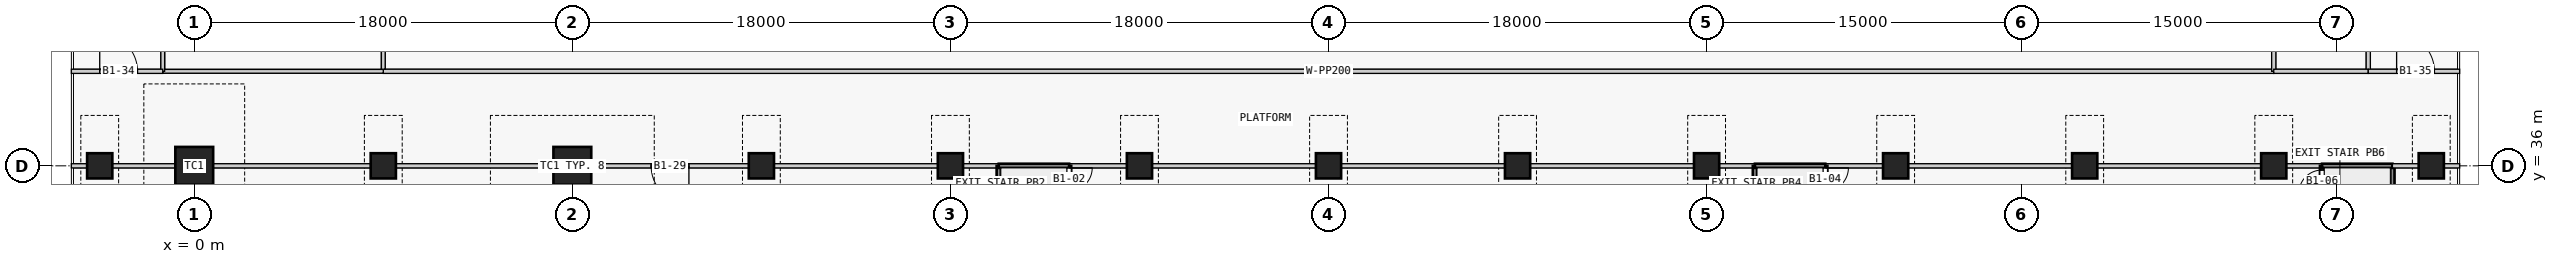
"""IFC4 building model, lengths in metres.
Left out: names, types, materials, properties, quantities, classifications, styles, units other than length and angle.
Written with IfcOpenShell. Run it as: python <this file> out.ifc"""

import sys

from ifc_helpers import new_model, si_unit, direction, frame, frame_2d, origin, origin_2d, place, context, subcontext, project, spatial, rectangle, extrude, element, fill, save


model = new_model("IFC4")
c1 = context("Model", 3, precision=1e-05, world=origin(), true_north=direction((0.0, 1.0)))
c2 = subcontext(c1, "Body", "Model", "MODEL_VIEW")
j1 = project(units=[si_unit("LENGTHUNIT", "METRE"), si_unit("PLANEANGLEUNIT", "RADIAN")], contexts=[c1])
p1 = place(None, origin())
s1 = spatial("IfcSite", under=j1, at=p1, CompositionType="ELEMENT")
p2 = place(p1, origin())
s2 = spatial("IfcBuilding", under=s1, at=p2, CompositionType="ELEMENT")
p3 = place(p2, frame((0.0, 0.0, -7.0)))
s3 = spatial("IfcBuildingStorey", under=s2, at=p3, CompositionType="ELEMENT", Elevation=-7.0)
p4 = place(p3, frame((-4.5, 36.0, 0.0), z_axis=(0.0, 0.0, 1.0), x_axis=(1.0, 0.0, 0.0)))
e1 = element("IfcColumn", 1, at=p4, inside=s3, PredefinedType="COLUMN", context=c2, shape_type="SweptSolid", body=[
    extrude(rectangle(XDim=1.2, YDim=1.2, at=origin_2d()), origin(), (0.0, 0.0, 1.0), 7.0),
])
p5 = place(p3, frame((0.0, 36.0, 0.0), z_axis=(0.0, 0.0, 1.0), x_axis=(1.0, 0.0, 0.0)))
e2 = element("IfcColumn", 2, at=p5, inside=s3, PredefinedType="COLUMN", context=c2, shape_type="SweptSolid", body=[
    extrude(rectangle(XDim=1.8, YDim=1.8, at=origin_2d()), origin(), (0.0, 0.0, 1.0), 7.0),
])
p6 = place(p3, frame((9.0, 36.0, 0.0), z_axis=(0.0, 0.0, 1.0), x_axis=(1.0, 0.0, 0.0)))
e3 = element("IfcColumn", 3, at=p6, inside=s3, PredefinedType="COLUMN", context=c2, shape_type="SweptSolid", body=[
    extrude(rectangle(XDim=1.2, YDim=1.2, at=origin_2d()), origin(), (0.0, 0.0, 1.0), 7.0),
])
p7 = place(p3, frame((18.0, 36.0, 0.0), z_axis=(0.0, 0.0, 1.0), x_axis=(1.0, 0.0, 0.0)))
e4 = element("IfcColumn", 4, at=p7, inside=s3, PredefinedType="COLUMN", context=c2, shape_type="SweptSolid", body=[
    extrude(rectangle(XDim=1.8, YDim=1.8, at=origin_2d()), origin(), (0.0, 0.0, 1.0), 7.0),
])
for number, where, z_axis, x_axis in (
    (5, (27.0, 36.0, 0.0), (0.0, 0.0, 1.0), (1.0, 0.0, 0.0)),
    (6, (36.0, 36.0, 0.0), (0.0, 0.0, 1.0), (1.0, 0.0, 0.0)),
    (7, (45.0, 36.0, 0.0), (0.0, 0.0, 1.0), (1.0, 0.0, 0.0)),
    (8, (54.0, 36.0, 0.0), (0.0, 0.0, 1.0), (1.0, 0.0, 0.0)),
    (9, (63.0, 36.0, 0.0), (0.0, 0.0, 1.0), (1.0, 0.0, 0.0)),
    (10, (72.0, 36.0, 0.0), (0.0, 0.0, 1.0), (1.0, 0.0, 0.0)),
    (11, (81.0, 36.0, 0.0), (0.0, 0.0, 1.0), (1.0, 0.0, 0.0)),
    (12, (90.0, 36.0, 0.0), (0.0, 0.0, 1.0), (1.0, 0.0, 0.0)),
    (13, (99.0, 36.0, 0.0), (0.0, 0.0, 1.0), (1.0, 0.0, 0.0)),
    (14, (106.5, 36.0, 0.0), (0.0, 0.0, 1.0), (1.0, 0.0, 0.0)),
):
    element("IfcColumn", number, at=place(p3, frame(where, z_axis=z_axis, x_axis=x_axis)), inside=s3, PredefinedType="COLUMN", context=c2, shape_type="SweptSolid", body=[
        extrude(rectangle(XDim=1.2, YDim=1.2, at=origin_2d()), origin(), (0.0, 0.0, 1.0), 7.0),
    ])
p8 = place(p3, frame((9.0, 40.5, 0.0), z_axis=(0.0, 0.0, 1.0), x_axis=(1.0, 0.0, 0.0)))
e15 = element("IfcWall", 15, at=p8, inside=s3, PredefinedType="PARTITIONING", context=c2, shape_type="SweptSolid", body=[
    extrude(rectangle(XDim=90.0, YDim=0.2, at=frame_2d((45.0, 0.0))), origin(), (0.0, 0.0, 1.0), 6.55),
])
p9 = place(p3, frame((38.3, 36.0, 0.0), z_axis=(0.0, 0.0, 1.0), x_axis=(-1.0, 0.0, 0.0)))
e16 = element("IfcWall", 16, at=p9, inside=s3, PredefinedType="PARTITIONING", context=c2, shape_type="SweptSolid", body=[
    extrude(rectangle(XDim=1.7, YDim=0.2, at=frame_2d((0.85, 0.0))), origin(), (0.0, 0.0, 1.0), 6.55),
])
p10 = place(p3, frame((35.4, 36.0, 0.0), z_axis=(0.0, 0.0, 1.0), x_axis=(-1.0, 0.0, 0.0)))
e17 = element("IfcWall", 17, at=p10, inside=s3, PredefinedType="PARTITIONING", context=c2, shape_type="SweptSolid", body=[
    extrude(rectangle(XDim=7.8, YDim=0.2, at=frame_2d((3.9, 0.0))), origin(), (0.0, 0.0, 1.0), 6.55),
])
p11 = place(p3, frame((26.4, 36.0, 0.0), z_axis=(0.0, 0.0, 1.0), x_axis=(-1.0, 0.0, 0.0)))
e18 = element("IfcWall", 18, at=p11, inside=s3, PredefinedType="PARTITIONING", context=c2, shape_type="SweptSolid", body=[
    extrude(rectangle(XDim=7.5, YDim=0.2, at=frame_2d((3.75, 0.0))), origin(), (0.0, 0.0, 1.0), 6.55),
])
p12 = place(p11, frame((2.85, 0.0, 0.0)))
e19 = element("IfcOpeningElement", 19, at=p12, cuts=e18, PredefinedType="OPENING", context=c2, shape_type="SweptSolid", body=[
    extrude(rectangle(XDim=1.8, YDim=2.1, at=frame_2d((0.9, 1.05))), frame((0.0, 0.11, 0.0), z_axis=(0.0, -1.0, 0.0), x_axis=(1.0, 0.0, 0.0)), (0.0, 0.0, 1.0), 0.22),
])
for number, where, z_axis, x_axis in (
    (20, (17.1, 36.0, 0.0), (0.0, 0.0, 1.0), (-1.0, 0.0, 0.0)),
    (21, (8.4, 36.0, 0.0), (0.0, 0.0, 1.0), (-1.0, 0.0, 0.0)),
):
    element("IfcWall", number, at=place(p3, frame(where, z_axis=z_axis, x_axis=x_axis)), inside=s3, PredefinedType="PARTITIONING", context=c2, shape_type="SweptSolid", body=[
        extrude(rectangle(XDim=7.5, YDim=0.2, at=frame_2d((3.75, 0.0))), origin(), (0.0, 0.0, 1.0), 6.55),
    ])
p13 = place(p3, frame((-0.9, 36.0, 0.0), z_axis=(0.0, 0.0, 1.0), x_axis=(-1.0, 0.0, 0.0)))
e22 = element("IfcWall", 22, at=p13, inside=s3, PredefinedType="PARTITIONING", context=c2, shape_type="SweptSolid", body=[
    extrude(rectangle(XDim=3.0, YDim=0.2, at=frame_2d((1.5, 0.0))), origin(), (0.0, 0.0, 1.0), 6.55),
])
p14 = place(p3, frame((-5.1, 36.0, 0.0), z_axis=(0.0, 0.0, 1.0), x_axis=(-1.0, 0.0, 0.0)))
e23 = element("IfcWall", 23, at=p14, inside=s3, PredefinedType="PARTITIONING", context=c2, shape_type="SweptSolid", body=[
    extrude(rectangle(XDim=0.75, YDim=0.2, at=frame_2d((0.375, 0.0))), origin(), (0.0, 0.0, 1.0), 6.55),
])
p15 = place(p3, frame((74.3, 36.0, 0.0), z_axis=(0.0, 0.0, 1.0), x_axis=(-1.0, 0.0, 0.0)))
e24 = element("IfcWall", 24, at=p15, inside=s3, PredefinedType="PARTITIONING", context=c2, shape_type="SweptSolid", body=[
    extrude(rectangle(XDim=1.7, YDim=0.2, at=frame_2d((0.85, 0.0))), origin(), (0.0, 0.0, 1.0), 6.55),
])
for number, where, z_axis, x_axis in (
    (25, (71.4, 36.0, 0.0), (0.0, 0.0, 1.0), (-1.0, 0.0, 0.0)),
    (26, (62.4, 36.0, 0.0), (0.0, 0.0, 1.0), (-1.0, 0.0, 0.0)),
    (27, (53.4, 36.0, 0.0), (0.0, 0.0, 1.0), (-1.0, 0.0, 0.0)),
):
    element("IfcWall", number, at=place(p3, frame(where, z_axis=z_axis, x_axis=x_axis)), inside=s3, PredefinedType="PARTITIONING", context=c2, shape_type="SweptSolid", body=[
        extrude(rectangle(XDim=7.8, YDim=0.2, at=frame_2d((3.9, 0.0))), origin(), (0.0, 0.0, 1.0), 6.55),
    ])
p16 = place(p3, frame((44.4, 36.0, 0.0), z_axis=(0.0, 0.0, 1.0), x_axis=(-1.0, 0.0, 0.0)))
e28 = element("IfcWall", 28, at=p16, inside=s3, PredefinedType="PARTITIONING", context=c2, shape_type="SweptSolid", body=[
    extrude(rectangle(XDim=2.75, YDim=0.2, at=frame_2d((1.375, 0.0))), origin(), (0.0, 0.0, 1.0), 6.55),
])
p17 = place(p3, frame((101.3, 36.0, 0.0), z_axis=(0.0, 0.0, 1.0), x_axis=(-1.0, 0.0, 0.0)))
e29 = element("IfcWall", 29, at=p17, inside=s3, PredefinedType="PARTITIONING", context=c2, shape_type="SweptSolid", body=[
    extrude(rectangle(XDim=1.7, YDim=0.2, at=frame_2d((0.85, 0.0))), origin(), (0.0, 0.0, 1.0), 6.55),
])
for number, where, z_axis, x_axis in (
    (30, (98.4, 36.0, 0.0), (0.0, 0.0, 1.0), (-1.0, 0.0, 0.0)),
    (31, (89.4, 36.0, 0.0), (0.0, 0.0, 1.0), (-1.0, 0.0, 0.0)),
):
    element("IfcWall", number, at=place(p3, frame(where, z_axis=z_axis, x_axis=x_axis)), inside=s3, PredefinedType="PARTITIONING", context=c2, shape_type="SweptSolid", body=[
        extrude(rectangle(XDim=7.8, YDim=0.2, at=frame_2d((3.9, 0.0))), origin(), (0.0, 0.0, 1.0), 6.55),
    ])
p18 = place(p3, frame((80.4, 36.0, 0.0), z_axis=(0.0, 0.0, 1.0), x_axis=(-1.0, 0.0, 0.0)))
e32 = element("IfcWall", 32, at=p18, inside=s3, PredefinedType="PARTITIONING", context=c2, shape_type="SweptSolid", body=[
    extrude(rectangle(XDim=2.75, YDim=0.2, at=frame_2d((1.375, 0.0))), origin(), (0.0, 0.0, 1.0), 6.55),
])
p19 = place(p3, frame((-1.5, 40.5, 0.0), z_axis=(0.0, 0.0, 1.0), x_axis=(1.0, 0.0, 0.0)))
e33 = element("IfcWall", 33, at=p19, inside=s3, PredefinedType="PARTITIONING", context=c2, shape_type="SweptSolid", body=[
    extrude(rectangle(XDim=10.5, YDim=0.18, at=frame_2d((5.25, 0.0))), origin(), (0.0, 0.0, 1.0), 6.55),
])
p20 = place(p3, frame((99.0, 44.3, 0.0), z_axis=(0.0, 0.0, 1.0), x_axis=(0.0, -1.0, 0.0)))
e34 = element("IfcWall", 34, at=p20, inside=s3, PredefinedType="PARTITIONING", context=c2, shape_type="SweptSolid", body=[
    extrude(rectangle(XDim=3.8, YDim=0.2, at=frame_2d((1.9, 0.0))), origin(), (0.0, 0.0, 1.0), 6.55),
])
p21 = place(p3, frame((41.65, 36.0, 0.0), z_axis=(0.0, 0.0, 1.0), x_axis=(0.0, -1.0, 0.0)))
e35 = element("IfcWall", 35, at=p21, inside=s3, PredefinedType="PARTITIONING", context=c2, shape_type="SweptSolid", body=[
    extrude(rectangle(XDim=6.9, YDim=0.2, at=frame_2d((3.45, 0.0))), origin(), (0.0, 0.0, 1.0), 6.55),
])
p22 = place(p21, frame((0.1, 0.0, 0.0)))
e36 = element("IfcOpeningElement", 36, at=p22, cuts=e35, PredefinedType="OPENING", context=c2, shape_type="SweptSolid", body=[
    extrude(rectangle(XDim=1.1, YDim=2.1, at=frame_2d((0.55, 1.05))), frame((0.0, 0.11, 0.0), z_axis=(0.0, -1.0, 0.0), x_axis=(1.0, 0.0, 0.0)), (0.0, 0.0, 1.0), 0.22),
])
p23 = place(p3, frame((77.65, 36.0, 0.0), z_axis=(0.0, 0.0, 1.0), x_axis=(0.0, -1.0, 0.0)))
e37 = element("IfcWall", 37, at=p23, inside=s3, PredefinedType="PARTITIONING", context=c2, shape_type="SweptSolid", body=[
    extrude(rectangle(XDim=6.9, YDim=0.2, at=frame_2d((3.45, 0.0))), origin(), (0.0, 0.0, 1.0), 6.55),
])
p24 = place(p23, frame((0.1, 0.0, 0.0)))
e38 = element("IfcOpeningElement", 38, at=p24, cuts=e37, PredefinedType="OPENING", context=c2, shape_type="SweptSolid", body=[
    extrude(rectangle(XDim=1.1, YDim=2.1, at=frame_2d((0.55, 1.05))), frame((0.0, 0.11, 0.0), z_axis=(0.0, -1.0, 0.0), x_axis=(1.0, 0.0, 0.0)), (0.0, 0.0, 1.0), 0.22),
])
p25 = place(p3, frame((104.65, 36.0, 0.0), z_axis=(0.0, 0.0, 1.0), x_axis=(0.0, -1.0, 0.0)))
e39 = element("IfcWall", 39, at=p25, inside=s3, PredefinedType="PARTITIONING", context=c2, shape_type="SweptSolid", body=[
    extrude(rectangle(XDim=6.9, YDim=0.2, at=frame_2d((3.45, 0.0))), origin(), (0.0, 0.0, 1.0), 6.55),
])
p26 = place(p3, frame((-1.5, 49.5, 0.0), z_axis=(0.0, 0.0, 1.0), x_axis=(0.0, -1.0, 0.0)))
e40 = element("IfcWall", 40, at=p26, inside=s3, PredefinedType="PARTITIONING", context=c2, shape_type="SweptSolid", body=[
    extrude(rectangle(XDim=9.0, YDim=0.18, at=frame_2d((4.5, 0.0))), origin(), (0.0, 0.0, 1.0), 6.55),
])
p27 = place(p3, frame((9.0, 40.6, 0.0), z_axis=(0.0, 0.0, 1.0), x_axis=(0.0, 1.0, 0.0)))
e41 = element("IfcWall", 41, at=p27, inside=s3, PredefinedType="PARTITIONING", context=c2, shape_type="SweptSolid", body=[
    extrude(rectangle(XDim=8.8, YDim=0.18, at=frame_2d((4.4, 0.0))), origin(), (0.0, 0.0, 1.0), 6.55),
])
p28 = place(p3, frame((103.5, 40.5, 0.0), z_axis=(0.0, 0.0, 1.0), x_axis=(0.0, 1.0, 0.0)))
e42 = element("IfcWall", 42, at=p28, inside=s3, PredefinedType="PARTITIONING", context=c2, shape_type="SweptSolid", body=[
    extrude(rectangle(XDim=9.0, YDim=0.2, at=frame_2d((4.5, 0.0))), origin(), (0.0, 0.0, 1.0), 6.55),
])
p29 = place(p28, frame((4.1, 0.0, 0.0)))
e43 = element("IfcOpeningElement", 43, at=p29, cuts=e42, PredefinedType="OPENING", context=c2, shape_type="SweptSolid", body=[
    extrude(rectangle(XDim=0.9, YDim=2.1, at=frame_2d((0.45, 1.05))), frame((0.0, 0.11, 0.0), z_axis=(0.0, -1.0, 0.0), x_axis=(1.0, 0.0, 0.0)), (0.0, 0.0, 1.0), 0.22),
])
for number, where, z_axis, x_axis in (
    (44, (38.3, 29.1, 0.0), (0.0, 0.0, 1.0), (0.0, 1.0, 0.0)),
    (45, (74.3, 29.1, 0.0), (0.0, 0.0, 1.0), (0.0, 1.0, 0.0)),
):
    element("IfcWall", number, at=place(p3, frame(where, z_axis=z_axis, x_axis=x_axis)), inside=s3, PredefinedType="PARTITIONING", context=c2, shape_type="SweptSolid", body=[
        extrude(rectangle(XDim=6.9, YDim=0.2, at=frame_2d((3.45, 0.0))), origin(), (0.0, 0.0, 1.0), 6.55),
    ])
p30 = place(p3, frame((101.3, 29.1, 0.0), z_axis=(0.0, 0.0, 1.0), x_axis=(0.0, 1.0, 0.0)))
e46 = element("IfcWall", 46, at=p30, inside=s3, PredefinedType="PARTITIONING", context=c2, shape_type="SweptSolid", body=[
    extrude(rectangle(XDim=6.9, YDim=0.2, at=frame_2d((3.45, 0.0))), origin(), (0.0, 0.0, 1.0), 6.55),
])
p31 = place(p30, frame((5.6, 0.0, 0.0)))
e47 = element("IfcOpeningElement", 47, at=p31, cuts=e46, PredefinedType="OPENING", context=c2, shape_type="SweptSolid", body=[
    extrude(rectangle(XDim=1.1, YDim=2.1, at=frame_2d((0.55, 1.05))), frame((0.0, 0.11, 0.0), z_axis=(0.0, -1.0, 0.0), x_axis=(1.0, 0.0, 0.0)), (0.0, 0.0, 1.0), 0.22),
])
p32 = place(p3, frame((99.0, 40.5, 0.0), z_axis=(0.0, 0.0, 1.0), x_axis=(1.0, 0.0, 0.0)))
e48 = element("IfcWall", 48, at=p32, inside=s3, PredefinedType="PARTITIONING", context=c2, shape_type="SweptSolid", body=[
    extrude(rectangle(XDim=4.5, YDim=0.2, at=frame_2d((2.25, 0.0))), origin(), (0.0, 0.0, 1.0), 6.55),
])
p33 = place(p3, frame((-5.85, 40.5, 0.0), z_axis=(0.0, 0.0, 1.0), x_axis=(1.0, 0.0, 0.0)))
e49 = element("IfcWall", 49, at=p33, inside=s3, PredefinedType="PARTITIONING", context=c2, shape_type="SweptSolid", body=[
    extrude(rectangle(XDim=4.35, YDim=0.2, at=frame_2d((2.175, 0.0))), origin(), (0.0, 0.0, 1.0), 6.55),
])
p34 = place(p33, frame((1.35, 0.0, 0.0)))
e50 = element("IfcOpeningElement", 50, at=p34, cuts=e49, PredefinedType="OPENING", context=c2, shape_type="SweptSolid", body=[
    extrude(rectangle(XDim=1.8, YDim=2.1, at=frame_2d((0.9, 1.05))), frame((0.0, 0.11, 0.0), z_axis=(0.0, -1.0, 0.0), x_axis=(1.0, 0.0, 0.0)), (0.0, 0.0, 1.0), 0.22),
])
p35 = place(p3, frame((103.5, 40.5, 0.0), z_axis=(0.0, 0.0, 1.0), x_axis=(1.0, 0.0, 0.0)))
e51 = element("IfcWall", 51, at=p35, inside=s3, PredefinedType="PARTITIONING", context=c2, shape_type="SweptSolid", body=[
    extrude(rectangle(XDim=4.35, YDim=0.2, at=frame_2d((2.175, 0.0))), origin(), (0.0, 0.0, 1.0), 6.55),
])
p36 = place(p35, frame((1.35, 0.0, 0.0)))
e52 = element("IfcOpeningElement", 52, at=p36, cuts=e51, PredefinedType="OPENING", context=c2, shape_type="SweptSolid", body=[
    extrude(rectangle(XDim=1.8, YDim=2.1, at=frame_2d((0.9, 1.05))), frame((0.0, 0.11, 0.0), z_axis=(0.0, -1.0, 0.0), x_axis=(1.0, 0.0, 0.0)), (0.0, 0.0, 1.0), 0.22),
])
for number, where, z_axis, x_axis in (
    (53, (38.3, 36.0, 0.0), (0.0, 0.0, 1.0), (1.0, 0.0, 0.0)),
    (54, (74.3, 36.0, 0.0), (0.0, 0.0, 1.0), (1.0, 0.0, 0.0)),
    (55, (101.3, 36.0, 0.0), (0.0, 0.0, 1.0), (1.0, 0.0, 0.0)),
):
    element("IfcWall", number, at=place(p3, frame(where, z_axis=z_axis, x_axis=x_axis)), inside=s3, PredefinedType="PARTITIONING", context=c2, shape_type="SweptSolid", body=[
        extrude(rectangle(XDim=3.35, YDim=0.2, at=frame_2d((1.675, 0.0))), origin(), (0.0, 0.0, 1.0), 6.55),
    ])
p37 = place(p3, frame((107.85, 36.0, 0.0), z_axis=(0.0, 0.0, 1.0), x_axis=(-1.0, 0.0, 0.0)))
e56 = element("IfcWall", 56, at=p37, inside=s3, PredefinedType="PARTITIONING", context=c2, shape_type="SweptSolid", body=[
    extrude(rectangle(XDim=0.75, YDim=0.2, at=frame_2d((0.375, 0.0))), origin(), (0.0, 0.0, 1.0), 6.55),
])
p38 = place(p3, frame((105.9, 36.0, 0.0), z_axis=(0.0, 0.0, 1.0), x_axis=(-1.0, 0.0, 0.0)))
e57 = element("IfcWall", 57, at=p38, inside=s3, PredefinedType="PARTITIONING", context=c2, shape_type="SweptSolid", body=[
    extrude(rectangle(XDim=1.25, YDim=0.2, at=frame_2d((0.625, 0.0))), origin(), (0.0, 0.0, 1.0), 6.55),
])
p39 = place(p22, origin())
e58 = element("IfcDoor", 58, at=p39, inside=s3, OperationType="SINGLE_SWING_LEFT", PredefinedType="DOOR", context=c2, shape_type="SweptSolid", body=[
    extrude(rectangle(XDim=1.1, YDim=2.1, at=frame_2d((0.55, 1.05))), frame((0.0, 0.025, 0.0), z_axis=(0.0, -1.0, 0.0), x_axis=(1.0, 0.0, 0.0)), (0.0, 0.0, 1.0), 0.05),
])
fill(e36, e58)
p40 = place(p24, origin())
e59 = element("IfcDoor", 59, at=p40, inside=s3, OperationType="SINGLE_SWING_LEFT", PredefinedType="DOOR", context=c2, shape_type="SweptSolid", body=[
    extrude(rectangle(XDim=1.1, YDim=2.1, at=frame_2d((0.55, 1.05))), frame((0.0, 0.025, 0.0), z_axis=(0.0, -1.0, 0.0), x_axis=(1.0, 0.0, 0.0)), (0.0, 0.0, 1.0), 0.05),
])
fill(e38, e59)
p41 = place(p31, origin())
e60 = element("IfcDoor", 60, at=p41, inside=s3, OperationType="SINGLE_SWING_RIGHT", PredefinedType="DOOR", context=c2, shape_type="SweptSolid", body=[
    extrude(rectangle(XDim=1.1, YDim=2.1, at=frame_2d((0.55, 1.05))), frame((0.0, 0.025, 0.0), z_axis=(0.0, -1.0, 0.0), x_axis=(1.0, 0.0, 0.0)), (0.0, 0.0, 1.0), 0.05),
])
fill(e47, e60)
p42 = place(p12, origin())
e61 = element("IfcDoor", 61, at=p42, inside=s3, OperationType="DOUBLE_DOOR_SINGLE_SWING", PredefinedType="DOOR", context=c2, shape_type="SweptSolid", body=[
    extrude(rectangle(XDim=1.8, YDim=2.1, at=frame_2d((0.9, 1.05))), frame((0.0, 0.025, 0.0), z_axis=(0.0, -1.0, 0.0), x_axis=(1.0, 0.0, 0.0)), (0.0, 0.0, 1.0), 0.05),
])
fill(e19, e61)
p43 = place(p34, origin())
e62 = element("IfcDoor", 62, at=p43, inside=s3, OperationType="DOUBLE_DOOR_SINGLE_SWING", PredefinedType="DOOR", context=c2, shape_type="SweptSolid", body=[
    extrude(rectangle(XDim=1.8, YDim=2.1, at=frame_2d((0.9, 1.05))), frame((0.0, 0.025, 0.0), z_axis=(0.0, -1.0, 0.0), x_axis=(1.0, 0.0, 0.0)), (0.0, 0.0, 1.0), 0.05),
])
fill(e50, e62)
p44 = place(p36, origin())
e63 = element("IfcDoor", 63, at=p44, inside=s3, OperationType="DOUBLE_DOOR_SINGLE_SWING", PredefinedType="DOOR", context=c2, shape_type="SweptSolid", body=[
    extrude(rectangle(XDim=1.8, YDim=2.1, at=frame_2d((0.9, 1.05))), frame((0.0, 0.025, 0.0), z_axis=(0.0, -1.0, 0.0), x_axis=(1.0, 0.0, 0.0)), (0.0, 0.0, 1.0), 0.05),
])
fill(e52, e63)
save(model, sys.argv[1])
